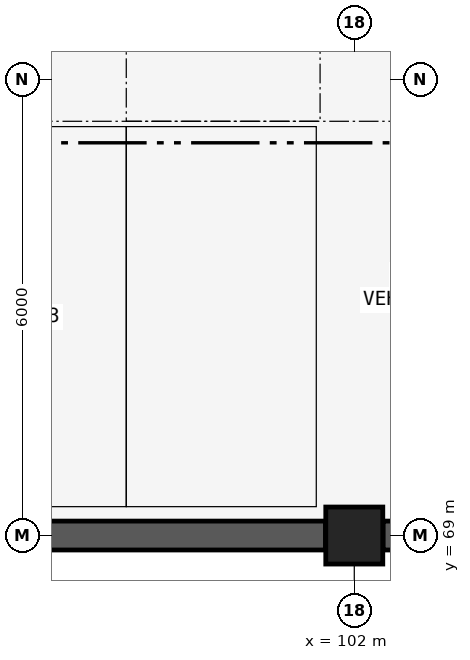
"""IFC4 building model, lengths in metres.
Left out: names, types, materials, properties, quantities, classifications, styles, units other than length and angle.
Written with IfcOpenShell. Run it as: python <this file> out.ifc"""

import sys

from ifc_helpers import new_model, si_unit, direction, frame, frame_2d, origin, origin_2d, place, context, subcontext, project, spatial, rectangle, extrude, element, save


model = new_model("IFC4")
c1 = context("Model", 3, precision=1e-05, world=origin(), true_north=direction((0.0, 1.0)))
c2 = subcontext(c1, "Body", "Model", "MODEL_VIEW")
j1 = project(units=[si_unit("LENGTHUNIT", "METRE"), si_unit("PLANEANGLEUNIT", "RADIAN")], contexts=[c1])
p1 = place(None, origin())
s1 = spatial("IfcSite", under=j1, at=p1, CompositionType="ELEMENT")
p2 = place(p1, origin())
s2 = spatial("IfcBuilding", under=s1, at=p2, CompositionType="ELEMENT")
p3 = place(p2, frame((0.0, 0.0, -4.5)))
s3 = spatial("IfcBuildingStorey", under=s2, at=p3, CompositionType="ELEMENT", Elevation=-4.5)
p4 = place(p3, frame((102.0, 69.0, 0.0), z_axis=(0.0, 0.0, 1.0), x_axis=(1.0, 0.0, 0.0)))
e1 = element("IfcColumn", 1, at=p4, inside=s3, PredefinedType="COLUMN", context=c2, shape_type="SweptSolid", body=[
    extrude(rectangle(XDim=0.75, YDim=0.75, at=origin_2d()), origin(), (0.0, 0.0, 1.0), 4.5),
])
p5 = place(p3, frame((96.379, 69.0, 0.0), z_axis=(0.0, 0.0, 1.0), x_axis=(1.0, 0.0, 0.0)))
e2 = element("IfcWall", 2, at=p5, inside=s3, PredefinedType="SHEAR", context=c2, shape_type="SweptSolid", body=[
    extrude(rectangle(XDim=5.242, YDim=0.38, at=frame_2d((2.621, 0.0))), origin(), (0.0, 0.0, 1.0), 4.195),
])
p6 = place(p3, frame((102.379, 69.0, 0.0), z_axis=(0.0, 0.0, 1.0), x_axis=(1.0, 0.0, 0.0)))
e3 = element("IfcWall", 3, at=p6, inside=s3, PredefinedType="SHEAR", context=c2, shape_type="SweptSolid", body=[
    extrude(rectangle(XDim=5.367, YDim=0.38, at=frame_2d((2.684, 0.0))), origin(), (0.0, 0.0, 1.0), 4.195),
])
save(model, sys.argv[1])
